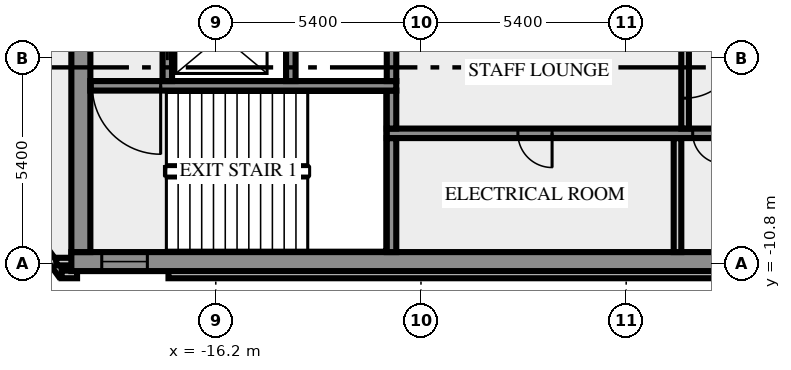
"""IFC4 building model, lengths in metres.
Left out: names, types, materials, properties, quantities, classifications, styles, units other than length and angle.
Written with IfcOpenShell. Run it as: python <this file> out.ifc"""

import sys

from ifc_helpers import new_model, si_unit, direction, frame, frame_2d, origin, place, context, subcontext, project, spatial, rectangle, extrude, element, fill, save


model = new_model("IFC4")
c1 = context("Model", 3, precision=1e-05, world=origin(), true_north=direction((0.0, 1.0)))
c2 = subcontext(c1, "Body", "Model", "MODEL_VIEW")
j1 = project(units=[si_unit("LENGTHUNIT", "METRE"), si_unit("PLANEANGLEUNIT", "RADIAN")], contexts=[c1])
p1 = place(None, origin())
s1 = spatial("IfcSite", under=j1, at=p1, CompositionType="ELEMENT")
p2 = place(p1, origin())
s2 = spatial("IfcBuilding", under=s1, at=p2, CompositionType="ELEMENT")
p3 = place(p2, frame((0.0, 0.0, 230.0)))
s3 = spatial("IfcBuildingStorey", under=s2, at=p3, CompositionType="ELEMENT", Elevation=230.0)
p4 = place(p3, frame((-21.833, -8.909, 0.0), z_axis=(0.0, 0.0, 1.0), x_axis=(0.587766567315, -0.809030569476, 0.0)))
e1 = element("IfcWall", 1, at=p4, inside=s3, PredefinedType="SOLIDWALL", context=c2, shape_type="SweptSolid", body=[
    extrude(rectangle(XDim=2.688, YDim=0.2, at=frame_2d((1.344, 0.0))), origin(), (0.0, 0.0, 1.0), 3.65),
])
p5 = place(p3, frame((-20.256, -11.088, 0.0), z_axis=(0.0, 0.0, 1.0), x_axis=(1.0, 0.0, 0.0)))
e2 = element("IfcWall", 2, at=p5, inside=s3, PredefinedType="SOLIDWALL", context=c2, shape_type="SweptSolid", body=[
    extrude(rectangle(XDim=0.406, YDim=0.2, at=frame_2d((0.203, 0.0))), origin(), (0.0, 0.0, 1.0), 3.65),
])
p6 = place(p3, frame((-17.444, -11.088, 0.0), z_axis=(0.0, 0.0, 1.0), x_axis=(1.0, 0.0, 0.0)))
e3 = element("IfcWall", 3, at=p6, inside=s3, PredefinedType="SOLIDWALL", context=c2, shape_type="SweptSolid", body=[
    extrude(rectangle(XDim=34.888, YDim=0.2, at=frame_2d((17.444, 0.0))), origin(), (0.0, 0.0, 1.0), 3.65),
])
p7 = place(p3, frame((-19.98, -10.75, 0.0), z_axis=(0.0, 0.0, 1.0), x_axis=(-1.0, 0.0, 0.0)))
e4 = element("IfcWall", 4, at=p7, inside=s3, PredefinedType="SOLIDWALL", context=c2, shape_type="SweptSolid", body=[
    extrude(rectangle(XDim=0.417, YDim=0.2, at=frame_2d((0.208, 0.0))), origin(), (0.0, 0.0, 1.0), 3.65),
])
p8 = place(p3, frame((-20.0, -10.75, 0.0), z_axis=(0.0, 0.0, 1.0), x_axis=(1.0, 0.0, 0.0)))
e5 = element("IfcWall", 5, at=p8, inside=s3, PredefinedType="SHEAR", context=c2, shape_type="SweptSolid", body=[
    extrude(rectangle(XDim=40.0, YDim=0.5, at=frame_2d((20.0, 0.0))), origin(), (0.0, 0.0, 1.0), 3.65),
])
p9 = place(p8, frame((0.8, 0.0, 1.0)))
e6 = element("IfcOpeningElement", 6, at=p9, cuts=e5, PredefinedType="OPENING", context=c2, shape_type="SweptSolid", body=[
    extrude(rectangle(XDim=1.2, YDim=1.2, at=frame_2d((0.6, 0.6))), frame((0.0, 0.26, 0.0), z_axis=(0.0, -1.0, 0.0), x_axis=(1.0, 0.0, 0.0)), (0.0, 0.0, 1.0), 0.52),
])
p10 = place(p8, frame((38.0, 0.0, 1.0)))
e7 = element("IfcOpeningElement", 7, at=p10, cuts=e5, PredefinedType="OPENING", context=c2, shape_type="SweptSolid", body=[
    extrude(rectangle(XDim=1.2, YDim=1.2, at=frame_2d((0.6, 0.6))), frame((0.0, 0.26, 0.0), z_axis=(0.0, -1.0, 0.0), x_axis=(1.0, 0.0, 0.0)), (0.0, 0.0, 1.0), 0.52),
])
p11 = place(p3, frame((-19.75, -10.5, 0.0), z_axis=(0.0, 0.0, 1.0), x_axis=(0.0, 1.0, 0.0)))
e8 = element("IfcWall", 8, at=p11, inside=s3, PredefinedType="SHEAR", context=c2, shape_type="SweptSolid", body=[
    extrude(rectangle(XDim=8.8, YDim=0.5, at=frame_2d((4.4, 0.0))), origin(), (0.0, 0.0, 1.0), 3.65),
])
p12 = place(p3, frame((-11.575, -10.5, 0.0), z_axis=(0.0, 0.0, 1.0), x_axis=(0.0, 1.0, 0.0)))
e9 = element("IfcWall", 9, at=p12, inside=s3, PredefinedType="SHEAR", context=c2, shape_type="SweptSolid", body=[
    extrude(rectangle(XDim=3.0, YDim=0.25, at=frame_2d((1.5, 0.0))), origin(), (0.0, 0.0, 1.0), 3.65),
])
p13 = place(p3, frame((-4.05, -10.5, 0.0), z_axis=(0.0, 0.0, 1.0), x_axis=(0.0, 1.0, 0.0)))
e10 = element("IfcWall", 10, at=p13, inside=s3, PredefinedType="SOLIDWALL", context=c2, shape_type="SweptSolid", body=[
    extrude(rectangle(XDim=3.0, YDim=0.2, at=frame_2d((1.5, 0.0))), origin(), (0.0, 0.0, 1.0), 3.65),
])
p14 = place(p3, frame((11.7, -7.375, 0.0), z_axis=(0.0, 0.0, 1.0), x_axis=(-1.0, 0.0, 0.0)))
e11 = element("IfcWall", 11, at=p14, inside=s3, PredefinedType="SHEAR", context=c2, shape_type="SweptSolid", body=[
    extrude(rectangle(XDim=23.4, YDim=0.25, at=frame_2d((11.7, 0.0))), origin(), (0.0, 0.0, 1.0), 3.65),
])
p15 = place(p14, frame((19.05, 0.0, 0.0)))
e12 = element("IfcOpeningElement", 12, at=p15, cuts=e11, PredefinedType="OPENING", context=c2, shape_type="SweptSolid", body=[
    extrude(rectangle(XDim=0.9, YDim=2.1, at=frame_2d((0.45, 1.05))), frame((0.0, 0.135, 0.0), z_axis=(0.0, -1.0, 0.0), x_axis=(1.0, 0.0, 0.0)), (0.0, 0.0, 1.0), 0.27),
])
p16 = place(p14, frame((14.55, 0.0, 0.0)))
e13 = element("IfcOpeningElement", 13, at=p16, cuts=e11, PredefinedType="OPENING", context=c2, shape_type="SweptSolid", body=[
    extrude(rectangle(XDim=0.8, YDim=2.1, at=frame_2d((0.4, 1.05))), frame((0.0, 0.135, 0.0), z_axis=(0.0, -1.0, 0.0), x_axis=(1.0, 0.0, 0.0)), (0.0, 0.0, 1.0), 0.27),
])
p17 = place(p14, frame((12.8, 0.0, 0.0)))
e14 = element("IfcOpeningElement", 14, at=p17, cuts=e11, PredefinedType="OPENING", context=c2, shape_type="SweptSolid", body=[
    extrude(rectangle(XDim=0.9, YDim=2.1, at=frame_2d((0.45, 1.05))), frame((0.0, 0.135, 0.0), z_axis=(0.0, -1.0, 0.0), x_axis=(1.0, 0.0, 0.0)), (0.0, 0.0, 1.0), 0.27),
])
p18 = place(p14, frame((10.7, 0.0, 0.0)))
e15 = element("IfcOpeningElement", 15, at=p18, cuts=e11, PredefinedType="OPENING", context=c2, shape_type="SweptSolid", body=[
    extrude(rectangle(XDim=0.9, YDim=2.1, at=frame_2d((0.45, 1.05))), frame((0.0, 0.135, 0.0), z_axis=(0.0, -1.0, 0.0), x_axis=(1.0, 0.0, 0.0)), (0.0, 0.0, 1.0), 0.27),
])
p19 = place(p14, frame((8.35, 0.0, 0.0)))
e16 = element("IfcOpeningElement", 16, at=p19, cuts=e11, PredefinedType="OPENING", context=c2, shape_type="SweptSolid", body=[
    extrude(rectangle(XDim=1.1, YDim=2.1, at=frame_2d((0.55, 1.05))), frame((0.0, 0.135, 0.0), z_axis=(0.0, -1.0, 0.0), x_axis=(1.0, 0.0, 0.0)), (0.0, 0.0, 1.0), 0.27),
])
p20 = place(p14, frame((5.85, 0.0, 0.0)))
e17 = element("IfcOpeningElement", 17, at=p20, cuts=e11, PredefinedType="OPENING", context=c2, shape_type="SweptSolid", body=[
    extrude(rectangle(XDim=1.1, YDim=2.1, at=frame_2d((0.55, 1.05))), frame((0.0, 0.135, 0.0), z_axis=(0.0, -1.0, 0.0), x_axis=(1.0, 0.0, 0.0)), (0.0, 0.0, 1.0), 0.27),
])
p21 = place(p14, frame((3.35, 0.0, 0.0)))
e18 = element("IfcOpeningElement", 18, at=p21, cuts=e11, PredefinedType="OPENING", context=c2, shape_type="SweptSolid", body=[
    extrude(rectangle(XDim=1.1, YDim=2.1, at=frame_2d((0.55, 1.05))), frame((0.0, 0.135, 0.0), z_axis=(0.0, -1.0, 0.0), x_axis=(1.0, 0.0, 0.0)), (0.0, 0.0, 1.0), 0.27),
])
p22 = place(p14, frame((0.85, 0.0, 0.0)))
e19 = element("IfcOpeningElement", 19, at=p22, cuts=e11, PredefinedType="OPENING", context=c2, shape_type="SweptSolid", body=[
    extrude(rectangle(XDim=1.1, YDim=2.1, at=frame_2d((0.55, 1.05))), frame((0.0, 0.135, 0.0), z_axis=(0.0, -1.0, 0.0), x_axis=(1.0, 0.0, 0.0)), (0.0, 0.0, 1.0), 0.27),
])
p23 = place(p3, frame((-11.575, -7.25, 0.0), z_axis=(0.0, 0.0, 1.0), x_axis=(0.0, 1.0, 0.0)))
e20 = element("IfcWall", 20, at=p23, inside=s3, PredefinedType="SHEAR", context=c2, shape_type="SweptSolid", body=[
    extrude(rectangle(XDim=1.0, YDim=0.25, at=frame_2d((0.5, 0.0))), origin(), (0.0, 0.0, 1.0), 3.65),
])
p24 = place(p3, frame((-3.85, -4.25, 0.0), z_axis=(0.0, 0.0, 1.0), x_axis=(0.0, -1.0, 0.0)))
e21 = element("IfcWall", 21, at=p24, inside=s3, PredefinedType="SOLIDWALL", context=c2, shape_type="SweptSolid", body=[
    extrude(rectangle(XDim=3.0, YDim=0.2, at=frame_2d((1.5, 0.0))), origin(), (0.0, 0.0, 1.0), 3.65),
])
p25 = place(p24, frame((0.8, 0.0, 0.0)))
e22 = element("IfcOpeningElement", 22, at=p25, cuts=e21, PredefinedType="OPENING", context=c2, shape_type="SweptSolid", body=[
    extrude(rectangle(XDim=1.4, YDim=2.1, at=frame_2d((0.7, 1.05))), frame((0.0, 0.11, 0.0), z_axis=(0.0, -1.0, 0.0), x_axis=(1.0, 0.0, 0.0)), (0.0, 0.0, 1.0), 0.22),
])
p26 = place(p3, frame((-11.45, -6.125, 0.0), z_axis=(0.0, 0.0, 1.0), x_axis=(-1.0, 0.0, 0.0)))
e23 = element("IfcWall", 23, at=p26, inside=s3, PredefinedType="SHEAR", context=c2, shape_type="SweptSolid", body=[
    extrude(rectangle(XDim=8.05, YDim=0.25, at=frame_2d((4.025, 0.0))), origin(), (0.0, 0.0, 1.0), 3.65),
])
p27 = place(p26, frame((6.2, 0.0, 0.0)))
e24 = element("IfcOpeningElement", 24, at=p27, cuts=e23, PredefinedType="OPENING", context=c2, shape_type="SweptSolid", body=[
    extrude(rectangle(XDim=1.8, YDim=2.1, at=frame_2d((0.9, 1.05))), frame((0.0, 0.135, 0.0), z_axis=(0.0, -1.0, 0.0), x_axis=(1.0, 0.0, 0.0)), (0.0, 0.0, 1.0), 0.27),
])
p28 = place(p3, frame((-17.475, -6.0, 0.0), z_axis=(0.0, 0.0, 1.0), x_axis=(0.0, 1.0, 0.0)))
e25 = element("IfcWall", 25, at=p28, inside=s3, PredefinedType="SHEAR", context=c2, shape_type="SweptSolid", body=[
    extrude(rectangle(XDim=4.3, YDim=0.25, at=frame_2d((2.15, 0.0))), origin(), (0.0, 0.0, 1.0), 3.65),
])
p29 = place(p28, frame((0.55, 0.0, 0.0)))
e26 = element("IfcOpeningElement", 26, at=p29, cuts=e25, PredefinedType="OPENING", context=c2, shape_type="SweptSolid", body=[
    extrude(rectangle(XDim=1.3, YDim=2.1, at=frame_2d((0.65, 1.05))), frame((0.0, 0.135, 0.0), z_axis=(0.0, -1.0, 0.0), x_axis=(1.0, 0.0, 0.0)), (0.0, 0.0, 1.0), 0.27),
])
for number, where, z_axis, x_axis in (
    (27, (-14.225, -6.0, 0.0), (0.0, 0.0, 1.0), (0.0, 1.0, 0.0)),
    (28, (-11.575, -6.0, 0.0), (0.0, 0.0, 1.0), (0.0, 1.0, 0.0)),
):
    element("IfcWall", number, at=place(p3, frame(where, z_axis=z_axis, x_axis=x_axis)), inside=s3, PredefinedType="SHEAR", context=c2, shape_type="SweptSolid", body=[
        extrude(rectangle(XDim=1.75, YDim=0.25, at=frame_2d((0.875, 0.0))), origin(), (0.0, 0.0, 1.0), 3.65),
    ])
p30 = place(p9, origin())
e29 = element("IfcWindow", 29, at=p30, inside=s3, PartitioningType="SINGLE_PANEL", PredefinedType="WINDOW", context=c2, shape_type="SweptSolid", body=[
    extrude(rectangle(XDim=1.2, YDim=1.2, at=frame_2d((0.6, 0.6))), frame((0.0, 0.03, 0.0), z_axis=(0.0, -1.0, 0.0), x_axis=(1.0, 0.0, 0.0)), (0.0, 0.0, 1.0), 0.06),
])
fill(e6, e29)
p31 = place(p15, origin())
e30 = element("IfcDoor", 30, at=p31, inside=s3, OperationType="SINGLE_SWING_RIGHT", PredefinedType="DOOR", context=c2, shape_type="SweptSolid", body=[
    extrude(rectangle(XDim=0.9, YDim=2.1, at=frame_2d((0.45, 1.05))), frame((0.0, 0.025, 0.0), z_axis=(0.0, -1.0, 0.0), x_axis=(1.0, 0.0, 0.0)), (0.0, 0.0, 1.0), 0.05),
])
fill(e12, e30)
p32 = place(p16, origin())
e31 = element("IfcDoor", 31, at=p32, inside=s3, OperationType="SINGLE_SWING_RIGHT", PredefinedType="DOOR", context=c2, shape_type="SweptSolid", body=[
    extrude(rectangle(XDim=0.8, YDim=2.1, at=frame_2d((0.4, 1.05))), frame((0.0, 0.025, 0.0), z_axis=(0.0, -1.0, 0.0), x_axis=(1.0, 0.0, 0.0)), (0.0, 0.0, 1.0), 0.05),
])
fill(e13, e31)
p33 = place(p25, origin())
e32 = element("IfcDoor", 32, at=p33, inside=s3, OperationType="DOUBLE_DOOR_SINGLE_SWING", PredefinedType="DOOR", context=c2, shape_type="SweptSolid", body=[
    extrude(rectangle(XDim=1.4, YDim=2.1, at=frame_2d((0.7, 1.05))), frame((0.0, 0.025, 0.0), z_axis=(0.0, -1.0, 0.0), x_axis=(1.0, 0.0, 0.0)), (0.0, 0.0, 1.0), 0.05),
])
fill(e22, e32)
p34 = place(p27, origin())
e33 = element("IfcDoor", 33, at=p34, inside=s3, OperationType="DOUBLE_DOOR_SINGLE_SWING", PredefinedType="DOOR", context=c2, shape_type="SweptSolid", body=[
    extrude(rectangle(XDim=1.8, YDim=2.1, at=frame_2d((0.9, 1.05))), frame((0.0, 0.025, 0.0), z_axis=(0.0, -1.0, 0.0), x_axis=(1.0, 0.0, 0.0)), (0.0, 0.0, 1.0), 0.05),
])
fill(e24, e33)
p35 = place(p29, origin())
e34 = element("IfcDoor", 34, at=p35, inside=s3, OperationType="DOUBLE_DOOR_SLIDING", PredefinedType="DOOR", context=c2, shape_type="SweptSolid", body=[
    extrude(rectangle(XDim=1.3, YDim=2.1, at=frame_2d((0.65, 1.05))), frame((0.0, 0.025, 0.0), z_axis=(0.0, -1.0, 0.0), x_axis=(1.0, 0.0, 0.0)), (0.0, 0.0, 1.0), 0.05),
])
fill(e26, e34)
save(model, sys.argv[1])
